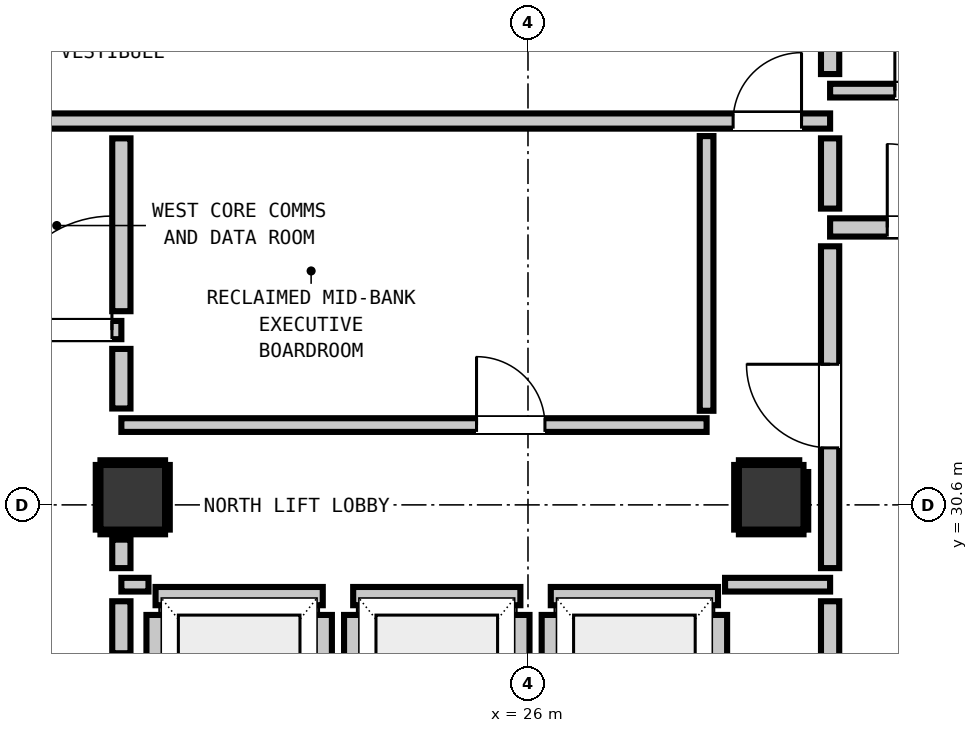
"""IFC4 building model, lengths in metres.
Left out: names, types, materials, properties, quantities, classifications, styles, units other than length and angle.
Written with IfcOpenShell. Run it as: python <this file> out.ifc"""

import sys

from ifc_helpers import new_model, si_unit, direction, frame, frame_2d, origin, origin_2d, place, context, subcontext, project, spatial, rectangle, extrude, element, fill, save


model = new_model("IFC4")
c1 = context("Model", 3, precision=1e-05, world=origin(), true_north=direction((0.0, 1.0)))
c2 = subcontext(c1, "Body", "Model", "MODEL_VIEW")
j1 = project(units=[si_unit("LENGTHUNIT", "METRE"), si_unit("PLANEANGLEUNIT", "RADIAN")], contexts=[c1])
p1 = place(None, origin())
s1 = spatial("IfcSite", under=j1, at=p1, CompositionType="ELEMENT")
p2 = place(p1, origin())
s2 = spatial("IfcBuilding", under=s1, at=p2, CompositionType="ELEMENT")
p3 = place(p2, frame((0.0, 0.0, 257.84)))
s3 = spatial("IfcBuildingStorey", under=s2, at=p3, CompositionType="ELEMENT", Elevation=257.84)
for number, where, z_axis, x_axis in (
    (1, (20.8, 30.7, 0.0), (0.0, 0.0, 1.0), (1.0, 0.0, 0.0)),
    (2, (29.2, 30.7, 0.0), (0.0, 0.0, 1.0), (1.0, 0.0, 0.0)),
):
    element("IfcColumn", number, at=place(p3, frame(where, z_axis=z_axis, x_axis=x_axis)), inside=s3, PredefinedType="COLUMN", context=c2, shape_type="SweptSolid", body=[
        extrude(rectangle(XDim=0.85, YDim=0.85, at=origin_2d()), origin(), (0.0, 0.0, 1.0), 4.4),
    ])
p4 = place(p3, frame((21.1, 29.4, 0.0), z_axis=(0.0, 0.0, 1.0), x_axis=(1.0, 0.0, 0.0)))
e3 = element("IfcWall", 3, at=p4, inside=s3, PredefinedType="PARTITIONING", context=c2, shape_type="SweptSolid", body=[
    extrude(rectangle(XDim=2.2, YDim=0.24, at=frame_2d((1.1, 0.0))), origin(), (0.0, 0.0, 1.0), 4.18),
])
p5 = place(p3, frame((21.1, 27.048, 0.0), z_axis=(0.0, 0.0, 1.0), x_axis=(0.0, 1.0, 0.0)))
e4 = element("IfcWall", 4, at=p5, inside=s3, PredefinedType="PARTITIONING", context=c2, shape_type="SweptSolid", body=[
    extrude(rectangle(XDim=2.104, YDim=0.24, at=frame_2d((1.052, 0.0))), origin(), (0.0, 0.0, 1.0), 3.415),
])
p6 = place(p3, frame((23.3, 27.048, 0.0), z_axis=(0.0, 0.0, 1.0), x_axis=(0.0, 1.0, 0.0)))
e5 = element("IfcWall", 5, at=p6, inside=s3, PredefinedType="PARTITIONING", context=c2, shape_type="SweptSolid", body=[
    extrude(rectangle(XDim=2.104, YDim=0.24, at=frame_2d((1.052, 0.0))), origin(), (0.0, 0.0, 1.0), 4.18),
])
p7 = place(p3, frame((23.7, 29.4, 0.0), z_axis=(0.0, 0.0, 1.0), x_axis=(1.0, 0.0, 0.0)))
e6 = element("IfcWall", 6, at=p7, inside=s3, PredefinedType="PARTITIONING", context=c2, shape_type="SweptSolid", body=[
    extrude(rectangle(XDim=2.2, YDim=0.24, at=frame_2d((1.1, 0.0))), origin(), (0.0, 0.0, 1.0), 4.18),
])
for number, where, z_axis, x_axis in (
    (7, (23.7, 27.048, 0.0), (0.0, 0.0, 1.0), (0.0, 1.0, 0.0)),
    (8, (25.9, 27.048, 0.0), (0.0, 0.0, 1.0), (0.0, 1.0, 0.0)),
):
    element("IfcWall", number, at=place(p3, frame(where, z_axis=z_axis, x_axis=x_axis)), inside=s3, PredefinedType="PARTITIONING", context=c2, shape_type="SweptSolid", body=[
        extrude(rectangle(XDim=2.104, YDim=0.24, at=frame_2d((1.052, 0.0))), origin(), (0.0, 0.0, 1.0), 4.18),
    ])
p8 = place(p3, frame((26.3, 29.4, 0.0), z_axis=(0.0, 0.0, 1.0), x_axis=(1.0, 0.0, 0.0)))
e9 = element("IfcWall", 9, at=p8, inside=s3, PredefinedType="PARTITIONING", context=c2, shape_type="SweptSolid", body=[
    extrude(rectangle(XDim=2.2, YDim=0.24, at=frame_2d((1.1, 0.0))), origin(), (0.0, 0.0, 1.0), 4.18),
])
p9 = place(p3, frame((26.3, 27.048, 0.0), z_axis=(0.0, 0.0, 1.0), x_axis=(0.0, 1.0, 0.0)))
e10 = element("IfcWall", 10, at=p9, inside=s3, PredefinedType="PARTITIONING", context=c2, shape_type="SweptSolid", body=[
    extrude(rectangle(XDim=2.104, YDim=0.24, at=frame_2d((1.052, 0.0))), origin(), (0.0, 0.0, 1.0), 4.18),
])
p10 = place(p3, frame((28.5, 27.33, 0.0), z_axis=(0.0, 0.0, 1.0), x_axis=(0.0, 1.0, 0.0)))
e11 = element("IfcWall", 11, at=p10, inside=s3, PredefinedType="PARTITIONING", context=c2, shape_type="SweptSolid", body=[
    extrude(rectangle(XDim=1.822, YDim=0.24, at=frame_2d((0.911, 0.0))), origin(), (0.0, 0.0, 1.0), 4.18),
])
p11 = place(p3, frame((17.45, 32.9, 0.0), z_axis=(0.0, 0.0, 1.0), x_axis=(1.0, 0.0, 0.0)))
e12 = element("IfcWall", 12, at=p11, inside=s3, PredefinedType="PARTITIONING", context=c2, shape_type="SweptSolid", body=[
    extrude(rectangle(XDim=3.2, YDim=0.24, at=frame_2d((1.6, 0.0))), origin(), (0.0, 0.0, 1.0), 4.18),
])
p12 = place(p11, frame((0.159, 0.0, 0.0)))
e13 = element("IfcOpeningElement", 13, at=p12, cuts=e12, PredefinedType="OPENING", context=c2, shape_type="SweptSolid", body=[
    extrude(rectangle(XDim=1.1, YDim=2.15, at=frame_2d((0.55, 1.075))), frame((0.0, 0.13, 0.0), z_axis=(0.0, -1.0, 0.0), x_axis=(1.0, 0.0, 0.0)), (0.0, 0.0, 1.0), 0.26),
])
p13 = place(p11, frame((1.576, 0.0, 0.0)))
e14 = element("IfcOpeningElement", 14, at=p13, cuts=e12, PredefinedType="OPENING", context=c2, shape_type="SweptSolid", body=[
    extrude(rectangle(XDim=1.5, YDim=2.15, at=frame_2d((0.75, 1.075))), frame((0.0, 0.13, 0.0), z_axis=(0.0, -1.0, 0.0), x_axis=(1.0, 0.0, 0.0)), (0.0, 0.0, 1.0), 0.26),
])
p14 = place(p3, frame((29.975, 34.25, 0.0), z_axis=(0.0, 0.0, 1.0), x_axis=(1.0, 0.0, 0.0)))
e15 = element("IfcWall", 15, at=p14, inside=s3, PredefinedType="PARTITIONING", context=c2, shape_type="SweptSolid", body=[
    extrude(rectangle(XDim=2.475, YDim=0.24, at=frame_2d((1.237, 0.0))), origin(), (0.0, 0.0, 1.0), 4.18),
])
p15 = place(p14, frame((0.752, 0.0, 0.0)))
e16 = element("IfcOpeningElement", 16, at=p15, cuts=e15, PredefinedType="OPENING", context=c2, shape_type="SweptSolid", body=[
    extrude(rectangle(XDim=1.1, YDim=2.15, at=frame_2d((0.55, 1.075))), frame((0.0, 0.13, 0.0), z_axis=(0.0, -1.0, 0.0), x_axis=(1.0, 0.0, 0.0)), (0.0, 0.0, 1.0), 0.26),
])
p16 = place(p3, frame((18.95, 35.65, 0.0), z_axis=(0.0, 0.0, 1.0), x_axis=(1.0, 0.0, 0.0)))
e17 = element("IfcWall", 17, at=p16, inside=s3, PredefinedType="PARTITIONING", context=c2, shape_type="SweptSolid", body=[
    extrude(rectangle(XDim=11.025, YDim=0.2, at=frame_2d((5.513, 0.0))), origin(), (0.0, 0.0, 1.0), 4.18),
])
p17 = place(p16, frame((9.749, 0.0, 0.0)))
e18 = element("IfcOpeningElement", 18, at=p17, cuts=e17, PredefinedType="OPENING", context=c2, shape_type="SweptSolid", body=[
    extrude(rectangle(XDim=0.9, YDim=2.1, at=frame_2d((0.45, 1.05))), frame((0.0, 0.11, 0.0), z_axis=(0.0, -1.0, 0.0), x_axis=(1.0, 0.0, 0.0)), (0.0, 0.0, 1.0), 0.22),
])
p18 = place(p3, frame((20.65, 29.55, 0.0), z_axis=(0.0, 0.0, 1.0), x_axis=(1.0, 0.0, 0.0)))
e19 = element("IfcWall", 19, at=p18, inside=s3, PredefinedType="PARTITIONING", context=c2, shape_type="SweptSolid", body=[
    extrude(rectangle(XDim=0.357, YDim=0.18, at=frame_2d((0.179, 0.0))), origin(), (0.0, 0.0, 1.0), 4.18),
])
p19 = place(p3, frame((28.593, 29.55, 0.0), z_axis=(0.0, 0.0, 1.0), x_axis=(1.0, 0.0, 0.0)))
e20 = element("IfcWall", 20, at=p19, inside=s3, PredefinedType="PARTITIONING", context=c2, shape_type="SweptSolid", body=[
    extrude(rectangle(XDim=1.382, YDim=0.18, at=frame_2d((0.691, 0.0))), origin(), (0.0, 0.0, 1.0), 4.18),
])
p20 = place(p3, frame((20.65, 31.65, 0.0), z_axis=(0.0, 0.0, 1.0), x_axis=(1.0, 0.0, 0.0)))
e21 = element("IfcWall", 21, at=p20, inside=s3, PredefinedType="PARTITIONING", context=c2, shape_type="SweptSolid", body=[
    extrude(rectangle(XDim=7.7, YDim=0.18, at=frame_2d((3.85, 0.0))), origin(), (0.0, 0.0, 1.0), 4.18),
])
p21 = place(p20, frame((4.673, 0.0, 0.0)))
e22 = element("IfcOpeningElement", 22, at=p21, cuts=e21, PredefinedType="OPENING", context=c2, shape_type="SweptSolid", body=[
    extrude(rectangle(XDim=0.9, YDim=2.1, at=frame_2d((0.45, 1.05))), frame((0.0, 0.1, 0.0), z_axis=(0.0, -1.0, 0.0), x_axis=(1.0, 0.0, 0.0)), (0.0, 0.0, 1.0), 0.2),
])
p22 = place(p3, frame((29.975, 36.05, 0.0), z_axis=(0.0, 0.0, 1.0), x_axis=(1.0, 0.0, 0.0)))
e23 = element("IfcWall", 23, at=p22, inside=s3, PredefinedType="PARTITIONING", context=c2, shape_type="SweptSolid", body=[
    extrude(rectangle(XDim=2.505, YDim=0.18, at=frame_2d((1.252, 0.0))), origin(), (0.0, 0.0, 1.0), 4.18),
])
p23 = place(p22, frame((0.852, 0.0, 0.0)))
e24 = element("IfcOpeningElement", 24, at=p23, cuts=e23, PredefinedType="OPENING", context=c2, shape_type="SweptSolid", body=[
    extrude(rectangle(XDim=0.9, YDim=2.1, at=frame_2d((0.45, 1.05))), frame((0.0, 0.1, 0.0), z_axis=(0.0, -1.0, 0.0), x_axis=(1.0, 0.0, 0.0)), (0.0, 0.0, 1.0), 0.2),
])
p24 = place(p3, frame((20.65, 28.648, 0.0), z_axis=(0.0, 0.0, 1.0), x_axis=(0.0, 1.0, 0.0)))
e25 = element("IfcWall", 25, at=p24, inside=s3, PredefinedType="PARTITIONING", context=c2, shape_type="SweptSolid", body=[
    extrude(rectangle(XDim=0.684, YDim=0.24, at=frame_2d((0.342, 0.0))), origin(), (0.0, 0.0, 1.0), 3.415),
])
p25 = place(p3, frame((20.65, 29.768, 0.0), z_axis=(0.0, 0.0, 1.0), x_axis=(0.0, 1.0, 0.0)))
e26 = element("IfcWall", 26, at=p25, inside=s3, PredefinedType="PARTITIONING", context=c2, shape_type="SweptSolid", body=[
    extrude(rectangle(XDim=0.375, YDim=0.24, at=frame_2d((0.188, 0.0))), origin(), (0.0, 0.0, 1.0), 3.415),
])
p26 = place(p3, frame((20.65, 31.868, 0.0), z_axis=(0.0, 0.0, 1.0), x_axis=(0.0, 1.0, 0.0)))
e27 = element("IfcWall", 27, at=p26, inside=s3, PredefinedType="PARTITIONING", context=c2, shape_type="SweptSolid", body=[
    extrude(rectangle(XDim=0.784, YDim=0.24, at=frame_2d((0.392, 0.0))), origin(), (0.0, 0.0, 1.0), 3.415),
])
p27 = place(p3, frame((20.65, 33.148, 0.0), z_axis=(0.0, 0.0, 1.0), x_axis=(0.0, 1.0, 0.0)))
e28 = element("IfcWall", 28, at=p27, inside=s3, PredefinedType="PARTITIONING", context=c2, shape_type="SweptSolid", body=[
    extrude(rectangle(XDim=2.274, YDim=0.24, at=frame_2d((1.137, 0.0))), origin(), (0.0, 0.0, 1.0), 3.415),
])
p28 = place(p3, frame((29.975, 25.648, 0.0), z_axis=(0.0, 0.0, 1.0), x_axis=(0.0, 1.0, 0.0)))
e29 = element("IfcWall", 29, at=p28, inside=s3, PredefinedType="PARTITIONING", context=c2, shape_type="SweptSolid", body=[
    extrude(rectangle(XDim=3.684, YDim=0.24, at=frame_2d((1.842, 0.0))), origin(), (0.0, 0.0, 1.0), 4.18),
])
p29 = place(p3, frame((29.975, 29.768, 0.0), z_axis=(0.0, 0.0, 1.0), x_axis=(0.0, 1.0, 0.0)))
e30 = element("IfcWall", 30, at=p29, inside=s3, PredefinedType="PARTITIONING", context=c2, shape_type="SweptSolid", body=[
    extrude(rectangle(XDim=4.234, YDim=0.24, at=frame_2d((2.117, 0.0))), origin(), (0.0, 0.0, 1.0), 4.18),
])
p30 = place(p29, frame((1.582, 0.0, 0.0)))
e31 = element("IfcOpeningElement", 31, at=p30, cuts=e30, PredefinedType="OPENING", context=c2, shape_type="SweptSolid", body=[
    extrude(rectangle(XDim=1.1, YDim=2.15, at=frame_2d((0.55, 1.075))), frame((0.0, 0.13, 0.0), z_axis=(0.0, -1.0, 0.0), x_axis=(1.0, 0.0, 0.0)), (0.0, 0.0, 1.0), 0.26),
])
p31 = place(p3, frame((29.975, 34.498, 0.0), z_axis=(0.0, 0.0, 1.0), x_axis=(0.0, 1.0, 0.0)))
e32 = element("IfcWall", 32, at=p31, inside=s3, PredefinedType="PARTITIONING", context=c2, shape_type="SweptSolid", body=[
    extrude(rectangle(XDim=0.924, YDim=0.24, at=frame_2d((0.462, 0.0))), origin(), (0.0, 0.0, 1.0), 4.18),
])
p32 = place(p3, frame((29.975, 36.268, 0.0), z_axis=(0.0, 0.0, 1.0), x_axis=(0.0, 1.0, 0.0)))
e33 = element("IfcWall", 33, at=p32, inside=s3, PredefinedType="PARTITIONING", context=c2, shape_type="SweptSolid", body=[
    extrude(rectangle(XDim=2.294, YDim=0.24, at=frame_2d((1.147, 0.0))), origin(), (0.0, 0.0, 1.0), 4.18),
])
p33 = place(p3, frame((28.35, 31.838, 0.0), z_axis=(0.0, 0.0, 1.0), x_axis=(0.0, 1.0, 0.0)))
e34 = element("IfcWall", 34, at=p33, inside=s3, PredefinedType="PARTITIONING", context=c2, shape_type="SweptSolid", body=[
    extrude(rectangle(XDim=3.614, YDim=0.18, at=frame_2d((1.807, 0.0))), origin(), (0.0, 0.0, 1.0), 4.18),
])
for number, where, z_axis, x_axis in (
    (35, (20.375, 30.243, 0.0), (0.0, 0.0, 1.0), (1.0, 0.0, 0.0)),
    (36, (20.375, 31.157, 0.0), (0.0, 0.0, 1.0), (1.0, 0.0, 0.0)),
    (37, (20.343, 30.275, 0.0), (0.0, 0.0, 1.0), (0.0, 1.0, 0.0)),
    (38, (21.257, 30.275, 0.0), (0.0, 0.0, 1.0), (0.0, 1.0, 0.0)),
    (39, (28.775, 30.243, 0.0), (0.0, 0.0, 1.0), (1.0, 0.0, 0.0)),
):
    element("IfcWall", number, at=place(p3, frame(where, z_axis=z_axis, x_axis=x_axis)), inside=s3, PredefinedType="PARTITIONING", context=c2, shape_type="SweptSolid", body=[
        extrude(rectangle(XDim=0.85, YDim=0.06, at=frame_2d((0.425, 0.0))), origin(), (0.0, 0.0, 1.0), 1.45),
    ])
p34 = place(p3, frame((28.775, 31.157, 0.0), z_axis=(0.0, 0.0, 1.0), x_axis=(1.0, 0.0, 0.0)))
e40 = element("IfcWall", 40, at=p34, inside=s3, PredefinedType="PARTITIONING", context=c2, shape_type="SweptSolid", body=[
    extrude(rectangle(XDim=0.794, YDim=0.06, at=frame_2d((0.397, 0.0))), origin(), (0.0, 0.0, 1.0), 1.45),
])
p35 = place(p3, frame((28.743, 30.275, 0.0), z_axis=(0.0, 0.0, 1.0), x_axis=(0.0, 1.0, 0.0)))
e41 = element("IfcWall", 41, at=p35, inside=s3, PredefinedType="PARTITIONING", context=c2, shape_type="SweptSolid", body=[
    extrude(rectangle(XDim=0.85, YDim=0.06, at=frame_2d((0.425, 0.0))), origin(), (0.0, 0.0, 1.0), 1.45),
])
p36 = place(p3, frame((29.657, 30.275, 0.0), z_axis=(0.0, 0.0, 1.0), x_axis=(0.0, 1.0, 0.0)))
e42 = element("IfcWall", 42, at=p36, inside=s3, PredefinedType="PARTITIONING", context=c2, shape_type="SweptSolid", body=[
    extrude(rectangle(XDim=0.757, YDim=0.06, at=frame_2d((0.378, 0.0))), origin(), (0.0, 0.0, 1.0), 1.45),
])
p37 = place(p30, origin())
e43 = element("IfcDoor", 43, at=p37, inside=s3, OperationType="SINGLE_SWING_RIGHT", PredefinedType="DOOR", context=c2, shape_type="SweptSolid", body=[
    extrude(rectangle(XDim=1.1, YDim=2.15, at=frame_2d((0.55, 1.075))), frame((0.0, 0.025, 0.0), z_axis=(0.0, -1.0, 0.0), x_axis=(1.0, 0.0, 0.0)), (0.0, 0.0, 1.0), 0.05),
])
fill(e31, e43)
p38 = place(p15, origin())
e44 = element("IfcDoor", 44, at=p38, inside=s3, OperationType="SINGLE_SWING_LEFT", PredefinedType="DOOR", context=c2, shape_type="SweptSolid", body=[
    extrude(rectangle(XDim=1.1, YDim=2.15, at=frame_2d((0.55, 1.075))), frame((0.0, 0.025, 0.0), z_axis=(0.0, -1.0, 0.0), x_axis=(1.0, 0.0, 0.0)), (0.0, 0.0, 1.0), 0.05),
])
fill(e16, e44)
p39 = place(p13, origin())
e45 = element("IfcDoor", 45, at=p39, inside=s3, OperationType="SINGLE_SWING_RIGHT", PredefinedType="DOOR", context=c2, shape_type="SweptSolid", body=[
    extrude(rectangle(XDim=1.5, YDim=2.15, at=frame_2d((0.75, 1.075))), frame((0.0, 0.025, 0.0), z_axis=(0.0, -1.0, 0.0), x_axis=(1.0, 0.0, 0.0)), (0.0, 0.0, 1.0), 0.05),
])
fill(e14, e45)
p40 = place(p23, origin())
e46 = element("IfcDoor", 46, at=p40, inside=s3, OperationType="SINGLE_SWING_LEFT", PredefinedType="DOOR", context=c2, shape_type="SweptSolid", body=[
    extrude(rectangle(XDim=0.9, YDim=2.1, at=frame_2d((0.45, 1.05))), frame((0.0, 0.025, 0.0), z_axis=(0.0, -1.0, 0.0), x_axis=(1.0, 0.0, 0.0)), (0.0, 0.0, 1.0), 0.05),
])
fill(e24, e46)
p41 = place(p17, origin())
e47 = element("IfcDoor", 47, at=p41, inside=s3, OperationType="SINGLE_SWING_RIGHT", PredefinedType="DOOR", context=c2, shape_type="SweptSolid", body=[
    extrude(rectangle(XDim=0.9, YDim=2.1, at=frame_2d((0.45, 1.05))), frame((0.0, 0.025, 0.0), z_axis=(0.0, -1.0, 0.0), x_axis=(1.0, 0.0, 0.0)), (0.0, 0.0, 1.0), 0.05),
])
fill(e18, e47)
p42 = place(p21, origin())
e48 = element("IfcDoor", 48, at=p42, inside=s3, OperationType="SINGLE_SWING_LEFT", PredefinedType="DOOR", context=c2, shape_type="SweptSolid", body=[
    extrude(rectangle(XDim=0.9, YDim=2.1, at=frame_2d((0.45, 1.05))), frame((0.0, 0.025, 0.0), z_axis=(0.0, -1.0, 0.0), x_axis=(1.0, 0.0, 0.0)), (0.0, 0.0, 1.0), 0.05),
])
fill(e22, e48)
save(model, sys.argv[1])
